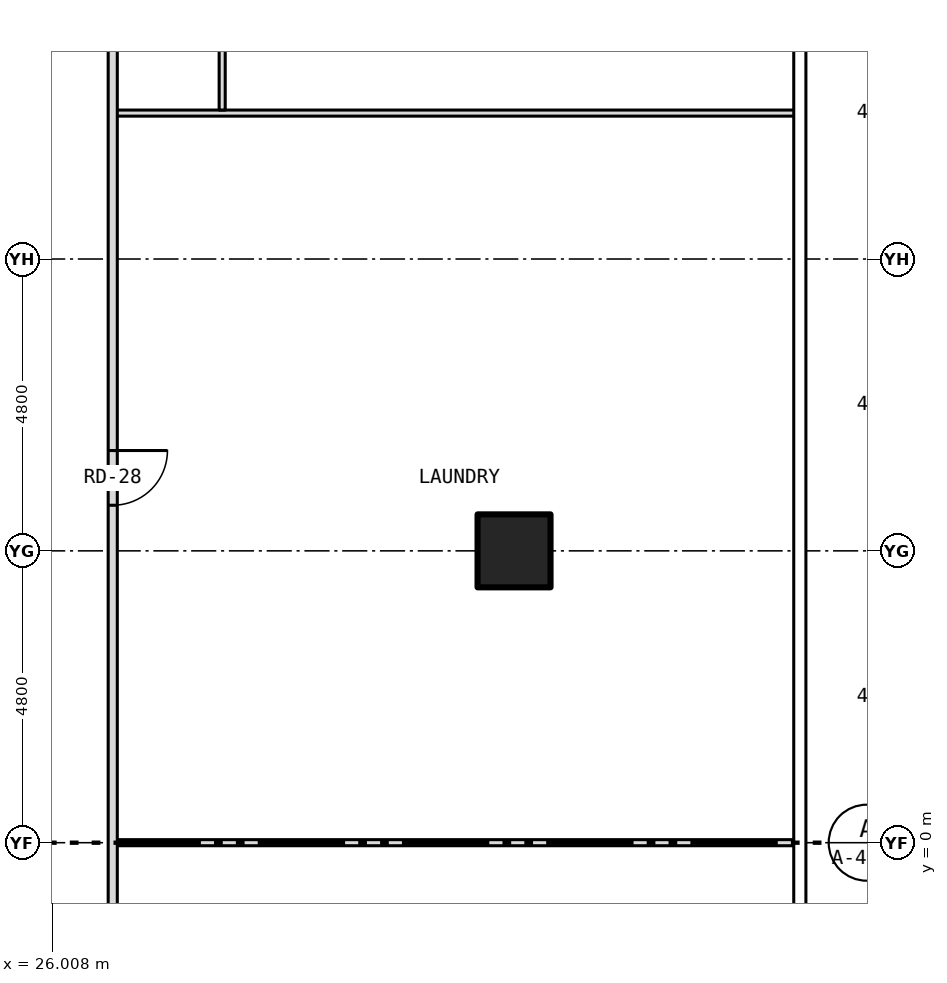
"""IFC4 building model, lengths in metres.
Left out: names, types, materials, properties, quantities, classifications, styles, units other than length and angle.
Written with IfcOpenShell. Run it as: python <this file> out.ifc"""

import sys

from ifc_helpers import new_model, si_unit, direction, frame, frame_2d, origin, origin_2d, place, context, subcontext, project, spatial, rectangle, hollow_rectangle, extrude, element, fill, save


model = new_model("IFC4")
c1 = context("Model", 3, precision=1e-05, world=origin(), true_north=direction((0.0, 1.0)))
c2 = subcontext(c1, "Body", "Model", "MODEL_VIEW")
j1 = project(units=[si_unit("LENGTHUNIT", "METRE"), si_unit("PLANEANGLEUNIT", "RADIAN")], contexts=[c1])
p1 = place(None, origin())
s1 = spatial("IfcSite", under=j1, at=p1, CompositionType="ELEMENT")
p2 = place(p1, origin())
s2 = spatial("IfcBuilding", under=s1, at=p2, CompositionType="ELEMENT")
p3 = place(p2, frame((0.0, 0.0, 20.0)))
s3 = spatial("IfcBuildingStorey", under=s2, at=p3, CompositionType="ELEMENT", Elevation=20.0)
p4 = place(p3, frame((33.6, 4.8, -0.2), z_axis=(0.0, 0.0, 1.0), x_axis=(1.0, 0.0, 0.0)))
e1 = element("IfcColumn", 1, at=p4, inside=s3, PredefinedType="COLUMN", context=c2, shape_type="SweptSolid", body=[
    extrude(hollow_rectangle(XDim=1.2, YDim=1.2, WallThickness=0.07, at=origin_2d()), origin(), (0.0, 0.0, 1.0), 4.5),
])
for number, where, z_axis, x_axis in (
    (2, (27.0, 0.0, 0.0), (0.0, 0.0, 1.0), (1.0, 0.0, 0.0)),
    (3, (27.0, 12.0, 0.0), (0.0, 0.0, 1.0), (1.0, 0.0, 0.0)),
):
    element("IfcWall", number, at=place(p3, frame(where, z_axis=z_axis, x_axis=x_axis)), inside=s3, PredefinedType="PARTITIONING", context=c2, shape_type="SweptSolid", body=[
        extrude(rectangle(XDim=11.28, YDim=0.1, at=frame_2d((5.64, 0.0))), origin(), (0.0, 0.0, 1.0), 4.3),
    ])
p5 = place(p3, frame((27.0, -13.725, 0.0), z_axis=(0.0, 0.0, 1.0), x_axis=(0.0, 1.0, 0.0)))
e4 = element("IfcWall", 4, at=p5, inside=s3, PredefinedType="PARTITIONING", context=c2, shape_type="SweptSolid", body=[
    extrude(rectangle(XDim=27.45, YDim=0.15, at=frame_2d((13.725, 0.0))), origin(), (0.0, 0.0, 1.0), 4.3),
])
p6 = place(p5, frame((7.275, 0.0, 0.0)))
e5 = element("IfcOpeningElement", 5, at=p6, cuts=e4, PredefinedType="OPENING", context=c2, shape_type="SweptSolid", body=[
    extrude(rectangle(XDim=0.9, YDim=2.1, at=frame_2d((0.45, 1.05))), frame((0.0, 0.087, 0.0), z_axis=(0.0, -1.0, 0.0), x_axis=(1.0, 0.0, 0.0)), (0.0, 0.0, 1.0), 0.174),
])
p7 = place(p5, frame((19.275, 0.0, 0.0)))
e6 = element("IfcOpeningElement", 6, at=p7, cuts=e4, PredefinedType="OPENING", context=c2, shape_type="SweptSolid", body=[
    extrude(rectangle(XDim=0.9, YDim=2.1, at=frame_2d((0.45, 1.05))), frame((0.0, 0.087, 0.0), z_axis=(0.0, -1.0, 0.0), x_axis=(1.0, 0.0, 0.0)), (0.0, 0.0, 1.0), 0.174),
])
p8 = place(p3, frame((28.8, 12.05, 0.0), z_axis=(0.0, 0.0, 1.0), x_axis=(0.0, 1.0, 0.0)))
e7 = element("IfcWall", 7, at=p8, inside=s3, PredefinedType="PARTITIONING", context=c2, shape_type="SweptSolid", body=[
    extrude(rectangle(XDim=2.196, YDim=0.1, at=frame_2d((1.098, 0.0))), origin(), (0.0, 0.0, 1.0), 3.683),
])
p9 = place(p7, origin())
e8 = element("IfcDoor", 8, at=p9, inside=s3, OperationType="SINGLE_SWING_RIGHT", PredefinedType="DOOR", context=c2, shape_type="SweptSolid", body=[
    extrude(rectangle(XDim=0.9, YDim=2.1, at=frame_2d((0.45, 1.05))), frame((0.0, 0.025, 0.0), z_axis=(0.0, -1.0, 0.0), x_axis=(1.0, 0.0, 0.0)), (0.0, 0.0, 1.0), 0.05),
])
fill(e6, e8)
save(model, sys.argv[1])
